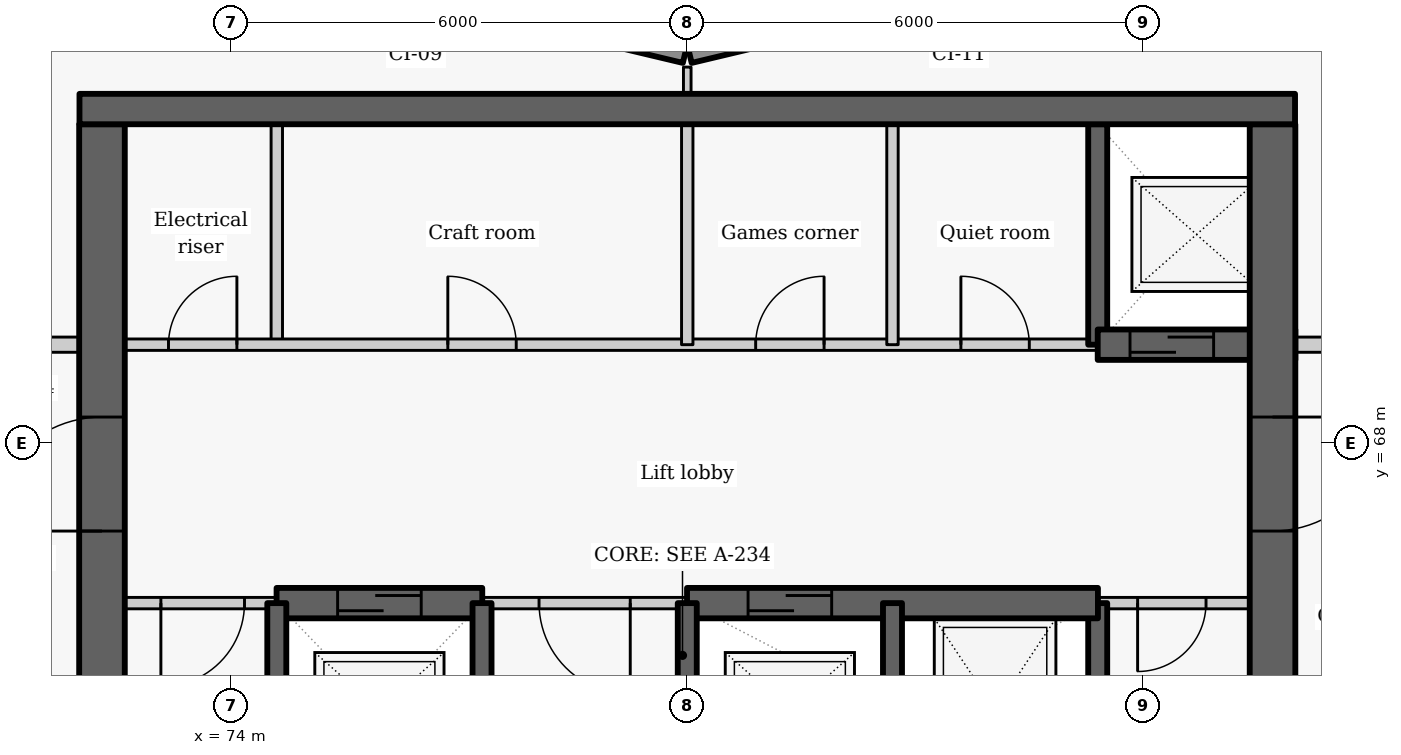
"""IFC4 building model, lengths in metres.
Left out: names, types, materials, properties, quantities, classifications, styles, units other than length and angle.
Written with IfcOpenShell. Run it as: python <this file> out.ifc"""

import sys

from ifc_helpers import new_model, si_unit, direction, frame, frame_2d, origin, place, context, subcontext, project, spatial, rectangle, extrude, element, fill, save


model = new_model("IFC4")
c1 = context("Model", 3, precision=1e-05, world=origin(), true_north=direction((0.0, 1.0)))
c2 = subcontext(c1, "Body", "Model", "MODEL_VIEW")
j1 = project(units=[si_unit("LENGTHUNIT", "METRE"), si_unit("PLANEANGLEUNIT", "RADIAN")], contexts=[c1])
p1 = place(None, origin())
s1 = spatial("IfcSite", under=j1, at=p1, CompositionType="ELEMENT")
p2 = place(p1, origin())
s2 = spatial("IfcBuilding", under=s1, at=p2, CompositionType="ELEMENT")
p3 = place(p2, frame((0.0, 0.0, 193.2)))
s3 = spatial("IfcBuildingStorey", under=s2, at=p3, CompositionType="ELEMENT", Elevation=193.2)
p4 = place(p3, frame((83.186, 73.881, 0.0), z_axis=(0.0, 0.0, 1.0), x_axis=(-0.972773113459, -0.231759508395, 0.0)))
e1 = element("IfcWall", 1, at=p4, inside=s3, PredefinedType="SOLIDWALL", context=c2, shape_type="SweptSolid", body=[
    extrude(rectangle(XDim=3.246, YDim=0.25, at=frame_2d((1.623, 0.0))), origin(), (0.0, 0.0, 1.0), 2.425),
])
p5 = place(p4, frame((0.573, 0.0, 0.9)))
e2 = element("IfcOpeningElement", 2, at=p5, cuts=e1, PredefinedType="OPENING", context=c2, shape_type="SweptSolid", body=[
    extrude(rectangle(XDim=2.1, YDim=1.1, at=frame_2d((1.05, 0.55))), frame((0.0, 0.135, 0.0), z_axis=(0.0, -1.0, 0.0), x_axis=(1.0, 0.0, 0.0)), (0.0, 0.0, 1.0), 0.27),
])
p6 = place(p3, frame((79.971, 73.128, 0.0), z_axis=(0.0, 0.0, 1.0), x_axis=(-0.972773113459, 0.231759508395, 0.0)))
e3 = element("IfcWall", 3, at=p6, inside=s3, PredefinedType="SOLIDWALL", context=c2, shape_type="SweptSolid", body=[
    extrude(rectangle(XDim=3.246, YDim=0.25, at=frame_2d((1.623, 0.0))), origin(), (0.0, 0.0, 1.0), 2.425),
])
p7 = place(p6, frame((0.573, 0.0, 0.9)))
e4 = element("IfcOpeningElement", 4, at=p7, cuts=e3, PredefinedType="OPENING", context=c2, shape_type="SweptSolid", body=[
    extrude(rectangle(XDim=2.1, YDim=1.1, at=frame_2d((1.05, 0.55))), frame((0.0, 0.135, 0.0), z_axis=(0.0, -1.0, 0.0), x_axis=(1.0, 0.0, 0.0)), (0.0, 0.0, 1.0), 0.27),
])
p8 = place(p3, frame((74.6, 69.3, 0.0), z_axis=(0.0, 0.0, 1.0), x_axis=(0.0, 1.0, 0.0)))
e5 = element("IfcWall", 5, at=p8, inside=s3, PredefinedType="PARTITIONING", context=c2, shape_type="SweptSolid", body=[
    extrude(rectangle(XDim=2.9, YDim=0.15, at=frame_2d((1.45, 0.0))), origin(), (0.0, 0.0, 1.0), 3.025),
])
p9 = place(p3, frame((72.0, 69.3, 0.0), z_axis=(0.0, 0.0, 1.0), x_axis=(1.0, 0.0, 0.0)))
e6 = element("IfcWall", 6, at=p9, inside=s3, PredefinedType="PARTITIONING", context=c2, shape_type="SweptSolid", body=[
    extrude(rectangle(XDim=13.4, YDim=0.15, at=frame_2d((6.7, 0.0))), origin(), (0.0, 0.0, 1.0), 3.025),
])
p10 = place(p9, frame((1.175, 0.0, 0.0)))
e7 = element("IfcOpeningElement", 7, at=p10, cuts=e6, PredefinedType="OPENING", context=c2, shape_type="SweptSolid", body=[
    extrude(rectangle(XDim=0.9, YDim=2.1, at=frame_2d((0.45, 1.05))), frame((0.0, 0.085, 0.0), z_axis=(0.0, -1.0, 0.0), x_axis=(1.0, 0.0, 0.0)), (0.0, 0.0, 1.0), 0.17),
])
p11 = place(p9, frame((4.85, 0.0, 0.0)))
e8 = element("IfcOpeningElement", 8, at=p11, cuts=e6, PredefinedType="OPENING", context=c2, shape_type="SweptSolid", body=[
    extrude(rectangle(XDim=0.9, YDim=2.1, at=frame_2d((0.45, 1.05))), frame((0.0, 0.085, 0.0), z_axis=(0.0, -1.0, 0.0), x_axis=(1.0, 0.0, 0.0)), (0.0, 0.0, 1.0), 0.17),
])
p12 = place(p9, frame((8.9, 0.0, 0.0)))
e9 = element("IfcOpeningElement", 9, at=p12, cuts=e6, PredefinedType="OPENING", context=c2, shape_type="SweptSolid", body=[
    extrude(rectangle(XDim=0.9, YDim=2.1, at=frame_2d((0.45, 1.05))), frame((0.0, 0.085, 0.0), z_axis=(0.0, -1.0, 0.0), x_axis=(1.0, 0.0, 0.0)), (0.0, 0.0, 1.0), 0.17),
])
p13 = place(p9, frame((11.6, 0.0, 0.0)))
e10 = element("IfcOpeningElement", 10, at=p13, cuts=e6, PredefinedType="OPENING", context=c2, shape_type="SweptSolid", body=[
    extrude(rectangle(XDim=0.9, YDim=2.1, at=frame_2d((0.45, 1.05))), frame((0.0, 0.085, 0.0), z_axis=(0.0, -1.0, 0.0), x_axis=(1.0, 0.0, 0.0)), (0.0, 0.0, 1.0), 0.17),
])
p14 = place(p3, frame((72.3, 63.1, -0.275), z_axis=(0.0, 0.0, 1.0), x_axis=(0.0, 1.0, 0.0)))
e11 = element("IfcWall", 11, at=p14, inside=s3, PredefinedType="SHEAR", context=c2, shape_type="SweptSolid", body=[
    extrude(rectangle(XDim=9.1, YDim=0.6, at=frame_2d((4.55, 0.0))), origin(), (0.0, 0.0, 1.0), 3.3),
])
p15 = place(p14, frame((3.748, 0.0, 0.275)))
e12 = element("IfcOpeningElement", 12, at=p15, cuts=e11, PredefinedType="OPENING", context=c2, shape_type="SweptSolid", body=[
    extrude(rectangle(XDim=1.5, YDim=2.1, at=frame_2d((0.75, 1.05))), frame((0.0, 0.31, 0.0), z_axis=(0.0, -1.0, 0.0), x_axis=(1.0, 0.0, 0.0)), (0.0, 0.0, 1.0), 0.62),
])
p16 = place(p3, frame((85.4, 63.1, -0.275), z_axis=(0.0, 0.0, 1.0), x_axis=(0.0, 1.0, 0.0)))
e13 = element("IfcWall", 13, at=p16, inside=s3, PredefinedType="SHEAR", context=c2, shape_type="SweptSolid", body=[
    extrude(rectangle(XDim=2.8, YDim=0.25, at=frame_2d((1.4, 0.0))), origin(), (0.0, 0.0, 1.0), 3.3),
])
p17 = place(p3, frame((85.4, 69.3, -0.275), z_axis=(0.0, 0.0, 1.0), x_axis=(0.0, 1.0, 0.0)))
e14 = element("IfcWall", 14, at=p17, inside=s3, PredefinedType="SHEAR", context=c2, shape_type="SweptSolid", body=[
    extrude(rectangle(XDim=2.9, YDim=0.25, at=frame_2d((1.45, 0.0))), origin(), (0.0, 0.0, 1.0), 3.3),
])
p18 = place(p3, frame((85.4, 69.3, -0.275), z_axis=(0.0, 0.0, 1.0), x_axis=(1.0, 0.0, 0.0)))
e15 = element("IfcWall", 15, at=p18, inside=s3, PredefinedType="SHEAR", context=c2, shape_type="SweptSolid", body=[
    extrude(rectangle(XDim=2.6, YDim=0.4, at=frame_2d((1.3, 0.0))), origin(), (0.0, 0.0, 1.0), 3.3),
])
p19 = place(p18, frame((0.425, 0.0, 0.275)))
e16 = element("IfcOpeningElement", 16, at=p19, cuts=e15, PredefinedType="OPENING", context=c2, shape_type="SweptSolid", body=[
    extrude(rectangle(XDim=1.1, YDim=2.1, at=frame_2d((0.55, 1.05))), frame((0.0, 0.21, 0.0), z_axis=(0.0, -1.0, 0.0), x_axis=(1.0, 0.0, 0.0)), (0.0, 0.0, 1.0), 0.42),
])
p20 = place(p3, frame((87.7, 72.2, -0.275), z_axis=(0.0, 0.0, 1.0), x_axis=(0.0, -1.0, 0.0)))
e17 = element("IfcWall", 17, at=p20, inside=s3, PredefinedType="SHEAR", context=c2, shape_type="SweptSolid", body=[
    extrude(rectangle(XDim=14.25, YDim=0.6, at=frame_2d((7.125, 0.0))), origin(), (0.0, 0.0, 1.0), 3.3),
])
p21 = place(p20, frame((3.852, 0.0, 0.275)))
e18 = element("IfcOpeningElement", 18, at=p21, cuts=e17, PredefinedType="OPENING", context=c2, shape_type="SweptSolid", body=[
    extrude(rectangle(XDim=1.5, YDim=2.1, at=frame_2d((0.75, 1.05))), frame((0.0, 0.31, 0.0), z_axis=(0.0, -1.0, 0.0), x_axis=(1.0, 0.0, 0.0)), (0.0, 0.0, 1.0), 0.62),
])
for number, where, z_axis, x_axis in (
    (19, (80.0, 69.3, 0.0), (0.0, 0.0, 1.0), (0.0, 1.0, 0.0)),
    (20, (82.7, 69.3, 0.0), (0.0, 0.0, 1.0), (0.0, 1.0, 0.0)),
):
    element("IfcWall", number, at=place(p3, frame(where, z_axis=z_axis, x_axis=x_axis)), inside=s3, PredefinedType="PARTITIONING", context=c2, shape_type="SweptSolid", body=[
        extrude(rectangle(XDim=2.9, YDim=0.15, at=frame_2d((1.45, 0.0))), origin(), (0.0, 0.0, 1.0), 3.025),
    ])
p22 = place(p3, frame((74.603, 65.9, 0.0), z_axis=(0.0, 0.0, 1.0), x_axis=(-1.0, 0.0, 0.0)))
e21 = element("IfcWall", 21, at=p22, inside=s3, PredefinedType="PARTITIONING", context=c2, shape_type="SweptSolid", body=[
    extrude(rectangle(XDim=2.603, YDim=0.15, at=frame_2d((1.302, 0.0))), origin(), (0.0, 0.0, 1.0), 3.025),
])
p23 = place(p22, frame((0.428, 0.0, 0.0)))
e22 = element("IfcOpeningElement", 22, at=p23, cuts=e21, PredefinedType="OPENING", context=c2, shape_type="SweptSolid", body=[
    extrude(rectangle(XDim=1.1, YDim=2.1, at=frame_2d((0.55, 1.05))), frame((0.0, 0.085, 0.0), z_axis=(0.0, -1.0, 0.0), x_axis=(1.0, 0.0, 0.0)), (0.0, 0.0, 1.0), 0.17),
])
p24 = place(p3, frame((80.003, 65.9, 0.0), z_axis=(0.0, 0.0, 1.0), x_axis=(-1.0, 0.0, 0.0)))
e23 = element("IfcWall", 23, at=p24, inside=s3, PredefinedType="PARTITIONING", context=c2, shape_type="SweptSolid", body=[
    extrude(rectangle(XDim=2.706, YDim=0.15, at=frame_2d((1.353, 0.0))), origin(), (0.0, 0.0, 1.0), 3.025),
])
p25 = place(p24, frame((0.753, 0.0, 0.0)))
e24 = element("IfcOpeningElement", 24, at=p25, cuts=e23, PredefinedType="OPENING", context=c2, shape_type="SweptSolid", body=[
    extrude(rectangle(XDim=1.2, YDim=2.1, at=frame_2d((0.6, 1.05))), frame((0.0, 0.085, 0.0), z_axis=(0.0, -1.0, 0.0), x_axis=(1.0, 0.0, 0.0)), (0.0, 0.0, 1.0), 0.17),
])
p26 = place(p3, frame((88.0, 65.9, 0.0), z_axis=(0.0, 0.0, 1.0), x_axis=(-1.0, 0.0, 0.0)))
e25 = element("IfcWall", 25, at=p26, inside=s3, PredefinedType="PARTITIONING", context=c2, shape_type="SweptSolid", body=[
    extrude(rectangle(XDim=2.603, YDim=0.15, at=frame_2d((1.302, 0.0))), origin(), (0.0, 0.0, 1.0), 3.025),
])
p27 = place(p26, frame((1.175, 0.0, 0.0)))
e26 = element("IfcOpeningElement", 26, at=p27, cuts=e25, PredefinedType="OPENING", context=c2, shape_type="SweptSolid", body=[
    extrude(rectangle(XDim=0.9, YDim=2.1, at=frame_2d((0.45, 1.05))), frame((0.0, 0.085, 0.0), z_axis=(0.0, -1.0, 0.0), x_axis=(1.0, 0.0, 0.0)), (0.0, 0.0, 1.0), 0.17),
])
p28 = place(p3, frame((74.597, 65.9, -0.275), z_axis=(0.0, 0.0, 1.0), x_axis=(1.0, 0.0, 0.0)))
e27 = element("IfcWall", 27, at=p28, inside=s3, PredefinedType="SHEAR", context=c2, shape_type="SweptSolid", body=[
    extrude(rectangle(XDim=2.706, YDim=0.4, at=frame_2d((1.353, 0.0))), origin(), (0.0, 0.0, 1.0), 3.3),
])
p29 = place(p28, frame((0.803, 0.0, 0.275)))
e28 = element("IfcOpeningElement", 28, at=p29, cuts=e27, PredefinedType="OPENING", context=c2, shape_type="SweptSolid", body=[
    extrude(rectangle(XDim=1.1, YDim=2.1, at=frame_2d((0.55, 1.05))), frame((0.0, 0.21, 0.0), z_axis=(0.0, -1.0, 0.0), x_axis=(1.0, 0.0, 0.0)), (0.0, 0.0, 1.0), 0.42),
])
p30 = place(p3, frame((79.997, 65.9, -0.275), z_axis=(0.0, 0.0, 1.0), x_axis=(1.0, 0.0, 0.0)))
e29 = element("IfcWall", 29, at=p30, inside=s3, PredefinedType="SHEAR", context=c2, shape_type="SweptSolid", body=[
    extrude(rectangle(XDim=5.406, YDim=0.4, at=frame_2d((2.703, 0.0))), origin(), (0.0, 0.0, 1.0), 3.3),
])
p31 = place(p30, frame((0.803, 0.0, 0.275)))
e30 = element("IfcOpeningElement", 30, at=p31, cuts=e29, PredefinedType="OPENING", context=c2, shape_type="SweptSolid", body=[
    extrude(rectangle(XDim=1.1, YDim=2.1, at=frame_2d((0.55, 1.05))), frame((0.0, 0.21, 0.0), z_axis=(0.0, -1.0, 0.0), x_axis=(1.0, 0.0, 0.0)), (0.0, 0.0, 1.0), 0.42),
])
for number, where, z_axis, x_axis in (
    (31, (74.6, 63.1, -0.275), (0.0, 0.0, 1.0), (0.0, 1.0, 0.0)),
    (32, (77.3, 63.1, -0.275), (0.0, 0.0, 1.0), (0.0, 1.0, 0.0)),
    (33, (80.0, 63.1, -0.275), (0.0, 0.0, 1.0), (0.0, 1.0, 0.0)),
    (34, (82.7, 63.1, -0.275), (0.0, 0.0, 1.0), (0.0, 1.0, 0.0)),
):
    element("IfcWall", number, at=place(p3, frame(where, z_axis=z_axis, x_axis=x_axis)), inside=s3, PredefinedType="SHEAR", context=c2, shape_type="SweptSolid", body=[
        extrude(rectangle(XDim=2.8, YDim=0.25, at=frame_2d((1.4, 0.0))), origin(), (0.0, 0.0, 1.0), 3.3),
    ])
for number, where, z_axis, x_axis in (
    (35, (70.45, 69.3, 0.0), (0.0, 0.0, 1.0), (1.0, 0.0, 0.0)),
    (36, (88.0, 69.3, 0.0), (0.0, 0.0, 1.0), (1.0, 0.0, 0.0)),
):
    element("IfcWall", number, at=place(p3, frame(where, z_axis=z_axis, x_axis=x_axis)), inside=s3, PredefinedType="PARTITIONING", context=c2, shape_type="SweptSolid", body=[
        extrude(rectangle(XDim=1.55, YDim=0.2, at=frame_2d((0.775, 0.0))), origin(), (0.0, 0.0, 1.0), 3.025),
    ])
p32 = place(p3, frame((80.0, 72.6, 0.0), z_axis=(0.0, 0.0, 1.0), x_axis=(0.0, 1.0, 0.0)))
e37 = element("IfcWall", 37, at=p32, inside=s3, PredefinedType="PARTITIONING", context=c2, shape_type="SweptSolid", body=[
    extrude(rectangle(XDim=0.352, YDim=0.1, at=frame_2d((0.176, 0.0))), origin(), (0.0, 0.0, 1.0), 3.025),
])
p33 = place(p3, frame((72.004, 72.4, -0.275), z_axis=(0.0, 0.0, 1.0), x_axis=(1.0, 0.0, 0.0)))
e38 = element("IfcWall", 38, at=p33, inside=s3, PredefinedType="SHEAR", context=c2, shape_type="SweptSolid", body=[
    extrude(rectangle(XDim=15.992, YDim=0.4, at=frame_2d((7.996, 0.0))), origin(), (0.0, 0.0, 1.0), 3.3),
])
p34 = place(p10, origin())
e39 = element("IfcDoor", 39, at=p34, inside=s3, OperationType="SINGLE_SWING_RIGHT", PredefinedType="DOOR", context=c2, shape_type="SweptSolid", body=[
    extrude(rectangle(XDim=0.9, YDim=2.1, at=frame_2d((0.45, 1.05))), frame((0.0, 0.025, 0.0), z_axis=(0.0, -1.0, 0.0), x_axis=(1.0, 0.0, 0.0)), (0.0, 0.0, 1.0), 0.05),
])
fill(e7, e39)
p35 = place(p19, origin())
e40 = element("IfcDoor", 40, at=p35, inside=s3, OperationType="SLIDING_TO_LEFT", PredefinedType="DOOR", context=c2, shape_type="SweptSolid", body=[
    extrude(rectangle(XDim=1.1, YDim=2.1, at=frame_2d((0.55, 1.05))), frame((0.0, 0.025, 0.0), z_axis=(0.0, -1.0, 0.0), x_axis=(1.0, 0.0, 0.0)), (0.0, 0.0, 1.0), 0.05),
])
fill(e16, e40)
p36 = place(p11, origin())
e41 = element("IfcDoor", 41, at=p36, inside=s3, OperationType="SINGLE_SWING_LEFT", PredefinedType="DOOR", context=c2, shape_type="SweptSolid", body=[
    extrude(rectangle(XDim=0.9, YDim=2.1, at=frame_2d((0.45, 1.05))), frame((0.0, 0.025, 0.0), z_axis=(0.0, -1.0, 0.0), x_axis=(1.0, 0.0, 0.0)), (0.0, 0.0, 1.0), 0.05),
])
fill(e8, e41)
p37 = place(p12, origin())
e42 = element("IfcDoor", 42, at=p37, inside=s3, OperationType="SINGLE_SWING_RIGHT", PredefinedType="DOOR", context=c2, shape_type="SweptSolid", body=[
    extrude(rectangle(XDim=0.9, YDim=2.1, at=frame_2d((0.45, 1.05))), frame((0.0, 0.025, 0.0), z_axis=(0.0, -1.0, 0.0), x_axis=(1.0, 0.0, 0.0)), (0.0, 0.0, 1.0), 0.05),
])
fill(e9, e42)
p38 = place(p13, origin())
e43 = element("IfcDoor", 43, at=p38, inside=s3, OperationType="SINGLE_SWING_LEFT", PredefinedType="DOOR", context=c2, shape_type="SweptSolid", body=[
    extrude(rectangle(XDim=0.9, YDim=2.1, at=frame_2d((0.45, 1.05))), frame((0.0, 0.025, 0.0), z_axis=(0.0, -1.0, 0.0), x_axis=(1.0, 0.0, 0.0)), (0.0, 0.0, 1.0), 0.05),
])
fill(e10, e43)
p39 = place(p23, origin())
e44 = element("IfcDoor", 44, at=p39, inside=s3, OperationType="SINGLE_SWING_RIGHT", PredefinedType="DOOR", context=c2, shape_type="SweptSolid", body=[
    extrude(rectangle(XDim=1.1, YDim=2.1, at=frame_2d((0.55, 1.05))), frame((0.0, 0.025, 0.0), z_axis=(0.0, -1.0, 0.0), x_axis=(1.0, 0.0, 0.0)), (0.0, 0.0, 1.0), 0.05),
])
fill(e22, e44)
p40 = place(p29, origin())
e45 = element("IfcDoor", 45, at=p40, inside=s3, OperationType="SLIDING_TO_LEFT", PredefinedType="DOOR", context=c2, shape_type="SweptSolid", body=[
    extrude(rectangle(XDim=1.1, YDim=2.1, at=frame_2d((0.55, 1.05))), frame((0.0, 0.025, 0.0), z_axis=(0.0, -1.0, 0.0), x_axis=(1.0, 0.0, 0.0)), (0.0, 0.0, 1.0), 0.05),
])
fill(e28, e45)
p41 = place(p25, origin())
e46 = element("IfcDoor", 46, at=p41, inside=s3, OperationType="DOUBLE_DOOR_SINGLE_SWING", PredefinedType="DOOR", context=c2, shape_type="SweptSolid", body=[
    extrude(rectangle(XDim=1.2, YDim=2.1, at=frame_2d((0.6, 1.05))), frame((0.0, 0.025, 0.0), z_axis=(0.0, -1.0, 0.0), x_axis=(1.0, 0.0, 0.0)), (0.0, 0.0, 1.0), 0.05),
])
fill(e24, e46)
p42 = place(p31, origin())
e47 = element("IfcDoor", 47, at=p42, inside=s3, OperationType="SLIDING_TO_LEFT", PredefinedType="DOOR", context=c2, shape_type="SweptSolid", body=[
    extrude(rectangle(XDim=1.1, YDim=2.1, at=frame_2d((0.55, 1.05))), frame((0.0, 0.025, 0.0), z_axis=(0.0, -1.0, 0.0), x_axis=(1.0, 0.0, 0.0)), (0.0, 0.0, 1.0), 0.05),
])
fill(e30, e47)
p43 = place(p27, origin())
e48 = element("IfcDoor", 48, at=p43, inside=s3, OperationType="SINGLE_SWING_RIGHT", PredefinedType="DOOR", context=c2, shape_type="SweptSolid", body=[
    extrude(rectangle(XDim=0.9, YDim=2.1, at=frame_2d((0.45, 1.05))), frame((0.0, 0.025, 0.0), z_axis=(0.0, -1.0, 0.0), x_axis=(1.0, 0.0, 0.0)), (0.0, 0.0, 1.0), 0.05),
])
fill(e26, e48)
p44 = place(p21, origin())
e49 = element("IfcDoor", 49, at=p44, inside=s3, OperationType="DOUBLE_DOOR_SINGLE_SWING", PredefinedType="DOOR", context=c2, shape_type="SweptSolid", body=[
    extrude(rectangle(XDim=1.5, YDim=2.1, at=frame_2d((0.75, 1.05))), frame((0.0, 0.025, 0.0), z_axis=(0.0, -1.0, 0.0), x_axis=(1.0, 0.0, 0.0)), (0.0, 0.0, 1.0), 0.05),
])
fill(e18, e49)
p45 = place(p15, origin())
e50 = element("IfcDoor", 50, at=p45, inside=s3, OperationType="DOUBLE_DOOR_SINGLE_SWING", PredefinedType="DOOR", context=c2, shape_type="SweptSolid", body=[
    extrude(rectangle(XDim=1.5, YDim=2.1, at=frame_2d((0.75, 1.05))), frame((0.0, 0.025, 0.0), z_axis=(0.0, -1.0, 0.0), x_axis=(1.0, 0.0, 0.0)), (0.0, 0.0, 1.0), 0.05),
])
fill(e12, e50)
save(model, sys.argv[1])
